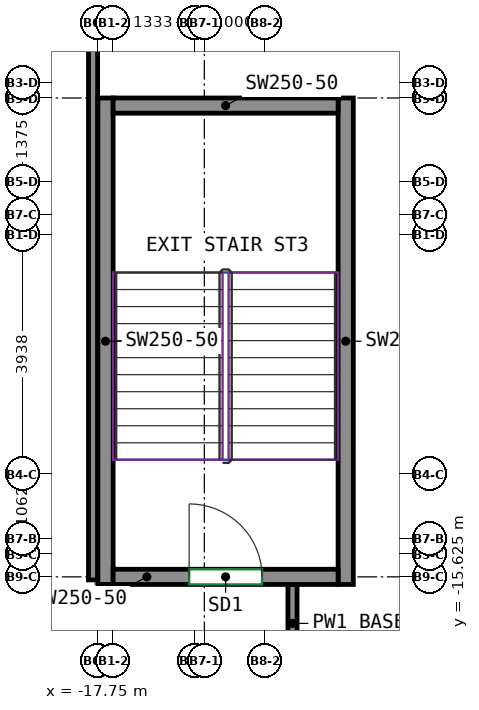
"""IFC4 building model, lengths in metres.
Left out: names, types, materials, properties, quantities, classifications, styles, units other than length and angle.
Written with IfcOpenShell. Run it as: python <this file> out.ifc"""

import sys

from ifc_helpers import new_model, si_unit, direction, frame, frame_2d, origin, place, context, subcontext, project, spatial, rectangle, extrude, source, transform, mapped, element, fill, save


model = new_model("IFC4")
c1 = context("Model", 3, precision=1e-05, world=origin(), true_north=direction((0.0, 1.0)))
c2 = subcontext(c1, "Body", "Model", "MODEL_VIEW")
j1 = project(units=[si_unit("LENGTHUNIT", "METRE"), si_unit("PLANEANGLEUNIT", "RADIAN")], contexts=[c1])
p1 = place(None, origin())
s1 = spatial("IfcSite", under=j1, at=p1, CompositionType="ELEMENT")
p2 = place(p1, origin())
s2 = spatial("IfcBuilding", under=s1, at=p2, CompositionType="ELEMENT")
p3 = place(p2, frame((0.0, 0.0, 290.8)))
s3 = spatial("IfcBuildingStorey", under=s2, at=p3, CompositionType="ELEMENT", Elevation=290.8)
m1 = source(origin(), c2, "Body", "SweptSolid", [
    extrude(rectangle(XDim=8.0, YDim=0.25, at=frame_2d((4.0, 0.0))), origin(), (0.0, 0.0, 1.0), 3.8),
])
for number, where, z_axis, x_axis in (
    (1, (-17.625, -15.75, 0.0), (0.0, 0.0, 1.0), (0.0, 1.0, 0.0)),
    (2, (-13.675, -15.75, 0.0), (0.0, 0.0, 1.0), (0.0, 1.0, 0.0)),
):
    element("IfcWall", number, at=place(p3, frame(where, z_axis=z_axis, x_axis=x_axis)), inside=s3, PredefinedType="SHEAR", context=c2, shape_type="MappedRepresentation", body=[
        mapped(m1, transform((0.0, 0.0, 0.0))),
    ])
m2 = source(origin(), c2, "Body", "SweptSolid", [
    extrude(rectangle(XDim=3.7, YDim=0.25, at=frame_2d((1.85, 0.0))), origin(), (0.0, 0.0, 1.0), 3.8),
])
p4 = place(p3, frame((-17.5, -15.625, 0.0), z_axis=(0.0, 0.0, 1.0), x_axis=(1.0, 0.0, 0.0)))
e3 = element("IfcWall", 3, at=p4, inside=s3, PredefinedType="SHEAR", context=c2, shape_type="MappedRepresentation", body=[
    mapped(m2, transform((0.0, 0.0, 0.0))),
])
p5 = place(p4, frame((1.25, 0.0, 0.0)))
e4 = element("IfcOpeningElement", 4, at=p5, cuts=e3, PredefinedType="OPENING", context=c2, shape_type="SweptSolid", body=[
    extrude(rectangle(XDim=1.2, YDim=2.1, at=frame_2d((0.6, 1.05))), frame((0.0, 0.135, 0.0), z_axis=(0.0, -1.0, 0.0), x_axis=(1.0, 0.0, 0.0)), (0.0, 0.0, 1.0), 0.27),
])
p6 = place(p3, frame((-17.5, -7.875, 0.0), z_axis=(0.0, 0.0, 1.0), x_axis=(1.0, 0.0, 0.0)))
e5 = element("IfcWall", 5, at=p6, inside=s3, PredefinedType="SHEAR", context=c2, shape_type="MappedRepresentation", body=[
    mapped(m2, transform((0.0, 0.0, 0.0))),
])
p7 = place(p3, frame((-17.83, -15.675, 0.0), z_axis=(0.0, 0.0, 1.0), x_axis=(0.0, 1.0, 0.0)))
e6 = element("IfcWall", 6, at=p7, inside=s3, PredefinedType="PARTITIONING", context=c2, shape_type="SweptSolid", body=[
    extrude(rectangle(XDim=19.4, YDim=0.15, at=frame_2d((9.7, 0.0))), origin(), (0.0, 0.0, 1.0), 3.8),
])
p8 = place(p3, frame((-14.55, -17.03, 0.0), z_axis=(0.0, 0.0, 1.0), x_axis=(0.0, 1.0, 0.0)))
e7 = element("IfcWall", 7, at=p8, inside=s3, PredefinedType="PARTITIONING", context=c2, shape_type="SweptSolid", body=[
    extrude(rectangle(XDim=1.28, YDim=0.15, at=frame_2d((0.64, 0.0))), origin(), (0.0, 0.0, 1.0), 2.3),
])
p9 = place(p5, origin())
e8 = element("IfcDoor", 8, at=p9, inside=s3, OperationType="DOUBLE_DOOR_SINGLE_SWING", PredefinedType="DOOR", context=c2, shape_type="SweptSolid", body=[
    extrude(rectangle(XDim=1.2, YDim=2.1, at=frame_2d((0.6, 1.05))), frame((0.0, 0.025, 0.0), z_axis=(0.0, -1.0, 0.0), x_axis=(1.0, 0.0, 0.0)), (0.0, 0.0, 1.0), 0.05),
])
fill(e4, e8)
save(model, sys.argv[1])
